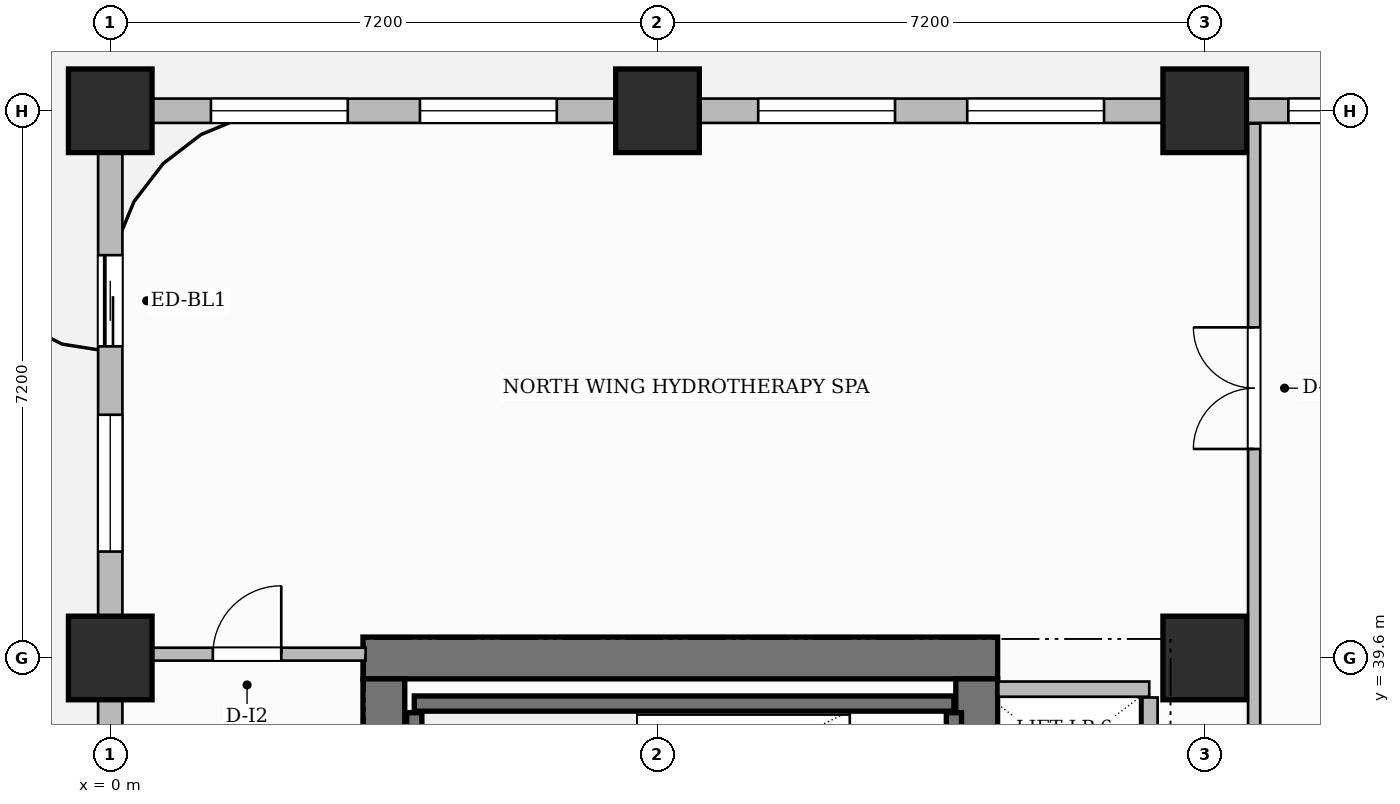
"""IFC4 building model, lengths in metres.
Left out: names, types, materials, properties, quantities, classifications, styles, units other than length and angle.
Written with IfcOpenShell. Run it as: python <this file> out.ifc"""

import sys

from ifc_helpers import new_model, si_unit, direction, frame, frame_2d, origin, origin_2d, place, context, subcontext, project, spatial, rectangle, extrude, source, transform, mapped, element, fill, save


model = new_model("IFC4")
c1 = context("Model", 3, precision=1e-05, world=origin(), true_north=direction((0.0, 1.0)))
c2 = subcontext(c1, "Body", "Model", "MODEL_VIEW")
j1 = project(units=[si_unit("LENGTHUNIT", "METRE"), si_unit("PLANEANGLEUNIT", "RADIAN")], contexts=[c1])
p1 = place(None, origin())
s1 = spatial("IfcSite", under=j1, at=p1, CompositionType="ELEMENT")
p2 = place(p1, origin())
s2 = spatial("IfcBuilding", under=s1, at=p2, CompositionType="ELEMENT")
p3 = place(p2, frame((0.0, 0.0, 69.4)))
s3 = spatial("IfcBuildingStorey", under=s2, at=p3, CompositionType="ELEMENT", Elevation=69.4)
p4 = place(p3, frame((3.325, 39.6, 0.0), z_axis=(0.0, 0.0, 1.0), x_axis=(1.0, 0.0, 0.0)))
e1 = element("IfcWall", 1, at=p4, inside=s3, PredefinedType="SHEAR", context=c2, shape_type="SweptSolid", body=[
    extrude(rectangle(XDim=8.35, YDim=0.55, at=frame_2d((4.175, 0.0))), origin(), (0.0, 0.0, 1.0), 3.7),
])
p5 = place(p3, frame((3.6, 25.475, 0.0), z_axis=(0.0, 0.0, 1.0), x_axis=(0.0, 1.0, 0.0)))
e2 = element("IfcWall", 2, at=p5, inside=s3, PredefinedType="SHEAR", context=c2, shape_type="SweptSolid", body=[
    extrude(rectangle(XDim=13.85, YDim=0.55, at=frame_2d((6.925, 0.0))), origin(), (0.0, 0.0, 1.0), 3.7),
])
p6 = place(p3, frame((11.4, 25.475, 0.0), z_axis=(0.0, 0.0, 1.0), x_axis=(0.0, 1.0, 0.0)))
e3 = element("IfcWall", 3, at=p6, inside=s3, PredefinedType="SHEAR", context=c2, shape_type="SweptSolid", body=[
    extrude(rectangle(XDim=13.85, YDim=0.55, at=frame_2d((6.925, 0.0))), origin(), (0.0, 0.0, 1.0), 3.7),
])
p7 = place(p6, frame((6.495, 0.0, 0.0)))
e4 = element("IfcOpeningElement", 4, at=p7, cuts=e3, PredefinedType="OPENING", context=c2, shape_type="SweptSolid", body=[
    extrude(rectangle(XDim=1.5, YDim=2.2, at=frame_2d((0.75, 1.1))), frame((0.0, 0.285, 0.0), z_axis=(0.0, -1.0, 0.0), x_axis=(1.0, 0.0, 0.0)), (0.0, 0.0, 1.0), 0.57),
])
m1 = source(origin(), c2, "Body", "SweptSolid", [
    extrude(rectangle(XDim=1.1, YDim=1.1, at=origin_2d()), origin(), (0.0, 0.0, 1.0), 3.7),
])
for number, where, z_axis, x_axis in (
    (5, (0.0, 39.6, 0.0), (0.0, 0.0, 1.0), (1.0, 0.0, 0.0)),
    (6, (0.0, 46.8, 0.0), (0.0, 0.0, 1.0), (1.0, 0.0, 0.0)),
    (7, (7.2, 46.8, 0.0), (0.0, 0.0, 1.0), (1.0, 0.0, 0.0)),
    (8, (14.4, 39.6, 0.0), (0.0, 0.0, 1.0), (1.0, 0.0, 0.0)),
    (9, (14.4, 46.8, 0.0), (0.0, 0.0, 1.0), (1.0, 0.0, 0.0)),
):
    element("IfcColumn", number, at=place(p3, frame(where, z_axis=z_axis, x_axis=x_axis)), inside=s3, PredefinedType="COLUMN", context=c2, shape_type="MappedRepresentation", body=[
        mapped(m1, transform((0.0, 0.0, 0.0), scale=1.0)),
    ])
p8 = place(p3, frame((4.0, 39.0, 0.0), z_axis=(0.0, 0.0, 1.0), x_axis=(1.0, 0.0, 0.0)))
e10 = element("IfcWall", 10, at=p8, inside=s3, PredefinedType="SHEAR", context=c2, shape_type="SweptSolid", body=[
    extrude(rectangle(XDim=7.1, YDim=0.2, at=frame_2d((3.55, 0.0))), origin(), (0.0, 0.0, 1.0), 3.7),
])
for number, where, z_axis, x_axis in (
    (11, (4.0, 36.18, 0.0), (0.0, 0.0, 1.0), (0.0, 1.0, 0.0)),
    (12, (11.1, 36.18, 0.0), (0.0, 0.0, 1.0), (0.0, 1.0, 0.0)),
):
    element("IfcWall", number, at=place(p3, frame(where, z_axis=z_axis, x_axis=x_axis)), inside=s3, PredefinedType="SHEAR", context=c2, shape_type="SweptSolid", body=[
        extrude(rectangle(XDim=2.7, YDim=0.2, at=frame_2d((1.35, 0.0))), origin(), (0.0, 0.0, 1.0), 3.7),
    ])
p9 = place(p3, frame((11.685, 39.19, 0.0), z_axis=(0.0, 0.0, 1.0), x_axis=(1.0, 0.0, 0.0)))
e13 = element("IfcWall", 13, at=p9, inside=s3, PredefinedType="PARTITIONING", context=c2, shape_type="SweptSolid", body=[
    extrude(rectangle(XDim=1.985, YDim=0.2, at=frame_2d((0.992, 0.0))), origin(), (0.0, 0.0, 1.0), 3.45),
])
p10 = place(p3, frame((13.68, 34.36, 0.0), z_axis=(0.0, 0.0, 1.0), x_axis=(0.0, 1.0, 0.0)))
e14 = element("IfcWall", 14, at=p10, inside=s3, PredefinedType="PARTITIONING", context=c2, shape_type="SweptSolid", body=[
    extrude(rectangle(XDim=4.72, YDim=0.2, at=frame_2d((2.36, 0.0))), origin(), (0.0, 0.0, 1.0), 3.45),
])
p11 = place(p3, frame((0.24, 39.65, 0.0), z_axis=(0.0, 0.0, 1.0), x_axis=(1.0, 0.0, 0.0)))
e15 = element("IfcWall", 15, at=p11, inside=s3, PredefinedType="PARTITIONING", context=c2, shape_type="SweptSolid", body=[
    extrude(rectangle(XDim=3.12, YDim=0.17, at=frame_2d((1.56, 0.0))), origin(), (0.0, 0.0, 1.0), 3.45),
])
p12 = place(p11, frame((1.11, 0.0, 0.0)))
e16 = element("IfcOpeningElement", 16, at=p12, cuts=e15, PredefinedType="OPENING", context=c2, shape_type="SweptSolid", body=[
    extrude(rectangle(XDim=0.9, YDim=2.15, at=frame_2d((0.45, 1.075))), frame((0.0, 0.095, 0.0), z_axis=(0.0, -1.0, 0.0), x_axis=(1.0, 0.0, 0.0)), (0.0, 0.0, 1.0), 0.19),
])
p13 = place(p3, frame((15.05, 34.34, 0.0), z_axis=(0.0, 0.0, 1.0), x_axis=(0.0, 1.0, 0.0)))
e17 = element("IfcWall", 17, at=p13, inside=s3, PredefinedType="PARTITIONING", context=c2, shape_type="SweptSolid", body=[
    extrude(rectangle(XDim=12.292, YDim=0.16, at=frame_2d((6.146, 0.0))), origin(), (0.0, 0.0, 1.0), 3.45),
])
p14 = place(p13, frame((8.01, 0.0, 0.0)))
e18 = element("IfcOpeningElement", 18, at=p14, cuts=e17, PredefinedType="OPENING", context=c2, shape_type="SweptSolid", body=[
    extrude(rectangle(XDim=1.6, YDim=2.4, at=frame_2d((0.8, 1.2))), frame((0.0, 0.09, 0.0), z_axis=(0.0, -1.0, 0.0), x_axis=(1.0, 0.0, 0.0)), (0.0, 0.0, 1.0), 0.18),
])
p15 = place(p3, frame((0.0, 25.25, 0.0), z_axis=(0.0, 0.0, 1.0), x_axis=(0.0, 1.0, 0.0)))
e19 = element("IfcWall", 19, at=p15, inside=s3, PredefinedType="SOLIDWALL", context=c2, shape_type="SweptSolid", body=[
    extrude(rectangle(XDim=21.5, YDim=0.32, at=frame_2d((10.75, 0.0))), origin(), (0.0, 0.0, 1.0), 2.885),
])
p16 = place(p15, frame((18.45, 0.0, 0.0)))
e20 = element("IfcOpeningElement", 20, at=p16, cuts=e19, PredefinedType="OPENING", context=c2, shape_type="SweptSolid", body=[
    extrude(rectangle(XDim=1.2, YDim=2.2, at=frame_2d((0.6, 1.1))), frame((0.0, 0.17, 0.0), z_axis=(0.0, -1.0, 0.0), x_axis=(1.0, 0.0, 0.0)), (0.0, 0.0, 1.0), 0.34),
])
p17 = place(p15, frame((0.8, 0.0, 0.0)))
e21 = element("IfcOpeningElement", 21, at=p17, cuts=e19, PredefinedType="OPENING", context=c2, shape_type="SweptSolid", body=[
    extrude(rectangle(XDim=1.2, YDim=2.2, at=frame_2d((0.6, 1.1))), frame((0.0, 0.17, 0.0), z_axis=(0.0, -1.0, 0.0), x_axis=(1.0, 0.0, 0.0)), (0.0, 0.0, 1.0), 0.34),
])
p18 = place(p15, frame((3.425, 0.0, 0.8)))
e22 = element("IfcOpeningElement", 22, at=p18, cuts=e19, PredefinedType="OPENING", context=c2, shape_type="SweptSolid", body=[
    extrude(rectangle(XDim=1.8, YDim=1.85, at=frame_2d((0.9, 0.925))), frame((0.0, 0.17, 0.0), z_axis=(0.0, -1.0, 0.0), x_axis=(1.0, 0.0, 0.0)), (0.0, 0.0, 1.0), 0.34),
])
p19 = place(p15, frame((8.475, 0.0, 0.8)))
e23 = element("IfcOpeningElement", 23, at=p19, cuts=e19, PredefinedType="OPENING", context=c2, shape_type="SweptSolid", body=[
    extrude(rectangle(XDim=1.8, YDim=1.85, at=frame_2d((0.9, 0.925))), frame((0.0, 0.17, 0.0), z_axis=(0.0, -1.0, 0.0), x_axis=(1.0, 0.0, 0.0)), (0.0, 0.0, 1.0), 0.34),
])
p20 = place(p15, frame((11.225, 0.0, 0.8)))
e24 = element("IfcOpeningElement", 24, at=p20, cuts=e19, PredefinedType="OPENING", context=c2, shape_type="SweptSolid", body=[
    extrude(rectangle(XDim=1.8, YDim=1.85, at=frame_2d((0.9, 0.925))), frame((0.0, 0.17, 0.0), z_axis=(0.0, -1.0, 0.0), x_axis=(1.0, 0.0, 0.0)), (0.0, 0.0, 1.0), 0.34),
])
p21 = place(p15, frame((15.75, 0.0, 0.8)))
e25 = element("IfcOpeningElement", 25, at=p21, cuts=e19, PredefinedType="OPENING", context=c2, shape_type="SweptSolid", body=[
    extrude(rectangle(XDim=1.8, YDim=1.85, at=frame_2d((0.9, 0.925))), frame((0.0, 0.17, 0.0), z_axis=(0.0, -1.0, 0.0), x_axis=(1.0, 0.0, 0.0)), (0.0, 0.0, 1.0), 0.34),
])
p22 = place(p3, frame((0.0, 46.8, 0.0), z_axis=(0.0, 0.0, 1.0), x_axis=(1.0, 0.0, 0.0)))
e26 = element("IfcWall", 26, at=p22, inside=s3, PredefinedType="SOLIDWALL", context=c2, shape_type="SweptSolid", body=[
    extrude(rectangle(XDim=18.0, YDim=0.32, at=frame_2d((9.0, 0.0))), origin(), (0.0, 0.0, 1.0), 2.885),
])
p23 = place(p22, frame((1.325, 0.0, 0.8)))
e27 = element("IfcOpeningElement", 27, at=p23, cuts=e26, PredefinedType="OPENING", context=c2, shape_type="SweptSolid", body=[
    extrude(rectangle(XDim=1.8, YDim=1.85, at=frame_2d((0.9, 0.925))), frame((0.0, 0.17, 0.0), z_axis=(0.0, -1.0, 0.0), x_axis=(1.0, 0.0, 0.0)), (0.0, 0.0, 1.0), 0.34),
])
p24 = place(p22, frame((4.075, 0.0, 0.8)))
e28 = element("IfcOpeningElement", 28, at=p24, cuts=e26, PredefinedType="OPENING", context=c2, shape_type="SweptSolid", body=[
    extrude(rectangle(XDim=1.8, YDim=1.85, at=frame_2d((0.9, 0.925))), frame((0.0, 0.17, 0.0), z_axis=(0.0, -1.0, 0.0), x_axis=(1.0, 0.0, 0.0)), (0.0, 0.0, 1.0), 0.34),
])
p25 = place(p22, frame((8.525, 0.0, 0.8)))
e29 = element("IfcOpeningElement", 29, at=p25, cuts=e26, PredefinedType="OPENING", context=c2, shape_type="SweptSolid", body=[
    extrude(rectangle(XDim=1.8, YDim=1.85, at=frame_2d((0.9, 0.925))), frame((0.0, 0.17, 0.0), z_axis=(0.0, -1.0, 0.0), x_axis=(1.0, 0.0, 0.0)), (0.0, 0.0, 1.0), 0.34),
])
p26 = place(p22, frame((11.275, 0.0, 0.8)))
e30 = element("IfcOpeningElement", 30, at=p26, cuts=e26, PredefinedType="OPENING", context=c2, shape_type="SweptSolid", body=[
    extrude(rectangle(XDim=1.8, YDim=1.85, at=frame_2d((0.9, 0.925))), frame((0.0, 0.17, 0.0), z_axis=(0.0, -1.0, 0.0), x_axis=(1.0, 0.0, 0.0)), (0.0, 0.0, 1.0), 0.34),
])
p27 = place(p22, frame((15.5, 0.0, 0.8)))
e31 = element("IfcOpeningElement", 31, at=p27, cuts=e26, PredefinedType="OPENING", context=c2, shape_type="SweptSolid", body=[
    extrude(rectangle(XDim=1.4, YDim=1.85, at=frame_2d((0.7, 0.925))), frame((0.0, 0.17, 0.0), z_axis=(0.0, -1.0, 0.0), x_axis=(1.0, 0.0, 0.0)), (0.0, 0.0, 1.0), 0.34),
])
m2 = source(origin(), c2, "Body", "SweptSolid", [
    extrude(rectangle(XDim=0.9, YDim=2.15, at=frame_2d((0.45, 1.075))), frame((0.0, 0.025, 0.0), z_axis=(0.0, -1.0, 0.0), x_axis=(1.0, 0.0, 0.0)), (0.0, 0.0, 1.0), 0.05),
])
p28 = place(p12, origin())
e32 = element("IfcDoor", 32, at=p28, inside=s3, OperationType="SINGLE_SWING_RIGHT", PredefinedType="DOOR", context=c2, shape_type="MappedRepresentation", body=[
    mapped(m2, transform((0.0, 0.0, 0.0), scale=1.0)),
])
fill(e16, e32)
m3 = source(origin(), c2, "Body", "SweptSolid", [
    extrude(rectangle(XDim=1.6, YDim=2.4, at=frame_2d((0.8, 1.2))), frame((0.0, 0.025, 0.0), z_axis=(0.0, -1.0, 0.0), x_axis=(1.0, 0.0, 0.0)), (0.0, 0.0, 1.0), 0.05),
])
p29 = place(p14, origin())
e33 = element("IfcDoor", 33, at=p29, inside=s3, OperationType="DOUBLE_DOOR_SINGLE_SWING", PredefinedType="DOOR", context=c2, shape_type="MappedRepresentation", body=[
    mapped(m3, transform((0.0, 0.0, 0.0), scale=1.0)),
])
fill(e18, e33)
m4 = source(origin(), c2, "Body", "SweptSolid", [
    extrude(rectangle(XDim=1.2, YDim=2.2, at=frame_2d((0.6, 1.1))), frame((0.0, 0.025, 0.0), z_axis=(0.0, -1.0, 0.0), x_axis=(1.0, 0.0, 0.0)), (0.0, 0.0, 1.0), 0.05),
])
p30 = place(p16, origin())
e34 = element("IfcDoor", 34, at=p30, inside=s3, OperationType="SLIDING_TO_LEFT", PredefinedType="DOOR", context=c2, shape_type="MappedRepresentation", body=[
    mapped(m4, transform((0.0, 0.0, 0.0), scale=1.0)),
])
fill(e20, e34)
m5 = source(origin(), c2, "Body", "SweptSolid", [
    extrude(rectangle(XDim=1.8, YDim=1.85, at=frame_2d((0.9, 0.925))), frame((0.0, 0.03, 0.0), z_axis=(0.0, -1.0, 0.0), x_axis=(1.0, 0.0, 0.0)), (0.0, 0.0, 1.0), 0.06),
])
p31 = place(p21, origin())
e35 = element("IfcWindow", 35, at=p31, inside=s3, PartitioningType="DOUBLE_PANEL_VERTICAL", PredefinedType="WINDOW", context=c2, shape_type="MappedRepresentation", body=[
    mapped(m5, transform((0.0, 0.0, 0.0), scale=1.0)),
])
fill(e25, e35)
p32 = place(p23, origin())
e36 = element("IfcWindow", 36, at=p32, inside=s3, PartitioningType="DOUBLE_PANEL_VERTICAL", PredefinedType="WINDOW", context=c2, shape_type="MappedRepresentation", body=[
    mapped(m5, transform((0.0, 0.0, 0.0), scale=1.0)),
])
fill(e27, e36)
p33 = place(p24, origin())
e37 = element("IfcWindow", 37, at=p33, inside=s3, PartitioningType="DOUBLE_PANEL_VERTICAL", PredefinedType="WINDOW", context=c2, shape_type="MappedRepresentation", body=[
    mapped(m5, transform((0.0, 0.0, 0.0), scale=1.0)),
])
fill(e28, e37)
p34 = place(p25, origin())
e38 = element("IfcWindow", 38, at=p34, inside=s3, PartitioningType="DOUBLE_PANEL_VERTICAL", PredefinedType="WINDOW", context=c2, shape_type="MappedRepresentation", body=[
    mapped(m5, transform((0.0, 0.0, 0.0), scale=1.0)),
])
fill(e29, e38)
p35 = place(p26, origin())
e39 = element("IfcWindow", 39, at=p35, inside=s3, PartitioningType="DOUBLE_PANEL_VERTICAL", PredefinedType="WINDOW", context=c2, shape_type="MappedRepresentation", body=[
    mapped(m5, transform((0.0, 0.0, 0.0), scale=1.0)),
])
fill(e30, e39)
m6 = source(origin(), c2, "Body", "SweptSolid", [
    extrude(rectangle(XDim=1.4, YDim=1.85, at=frame_2d((0.7, 0.925))), frame((0.0, 0.03, 0.0), z_axis=(0.0, -1.0, 0.0), x_axis=(1.0, 0.0, 0.0)), (0.0, 0.0, 1.0), 0.06),
])
p36 = place(p27, origin())
e40 = element("IfcWindow", 40, at=p36, inside=s3, PartitioningType="SINGLE_PANEL", PredefinedType="WINDOW", context=c2, shape_type="MappedRepresentation", body=[
    mapped(m6, transform((0.0, 0.0, 0.0), scale=1.0)),
])
fill(e31, e40)
save(model, sys.argv[1])
